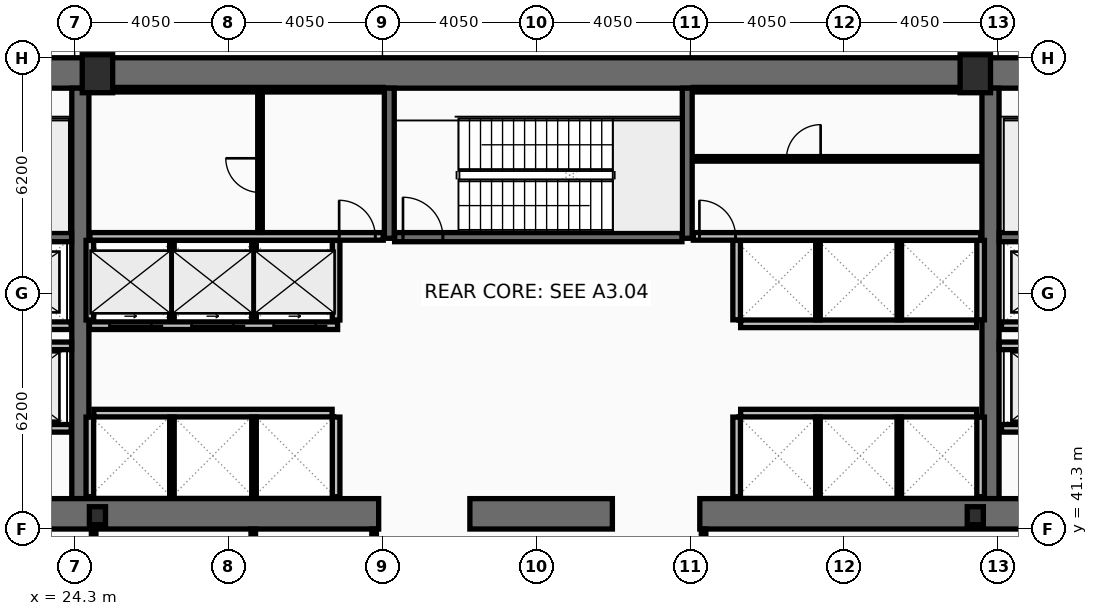
"""IFC4 building model, lengths in metres.
Left out: names, types, materials, properties, quantities, classifications, styles, units other than length and angle.
Written with IfcOpenShell. Run it as: python <this file> out.ifc"""

import sys

from ifc_helpers import new_model, si_unit, direction, frame, frame_2d, origin, origin_2d, place, context, subcontext, project, spatial, rectangle, hollow_rectangle, i_section, extrude, element, fill, save


model = new_model("IFC4")
c1 = context("Model", 3, precision=1e-05, world=origin(), true_north=direction((0.0, 1.0)))
c2 = subcontext(c1, "Body", "Model", "MODEL_VIEW")
j1 = project(units=[si_unit("LENGTHUNIT", "METRE"), si_unit("PLANEANGLEUNIT", "RADIAN")], contexts=[c1])
p1 = place(None, origin())
s1 = spatial("IfcSite", under=j1, at=p1, CompositionType="ELEMENT")
p2 = place(p1, origin())
s2 = spatial("IfcBuilding", under=s1, at=p2, CompositionType="ELEMENT")
p3 = place(p2, frame((0.0, 0.0, 5.4)))
s3 = spatial("IfcBuildingStorey", under=s2, at=p3, CompositionType="ELEMENT", Elevation=5.4)
p4 = place(p3, frame((16.2, 53.3, 0.0), z_axis=(0.0, 0.0, 1.0), x_axis=(1.0, 0.0, 0.0)))
e1 = element("IfcWall", 1, at=p4, inside=s3, PredefinedType="SHEAR", context=c2, shape_type="SweptSolid", body=[
    extrude(rectangle(XDim=40.5, YDim=0.8, at=frame_2d((20.25, 0.0))), origin(), (0.0, 0.0, 1.0), 4.8),
])
for number, where, z_axis, x_axis in (
    (2, (24.45, 42.1, 0.0), (0.0, 0.0, 1.0), (0.0, 1.0, 0.0)),
    (3, (48.4, 42.1, 0.0), (0.0, 0.0, 1.0), (0.0, 1.0, 0.0)),
):
    element("IfcWall", number, at=place(p3, frame(where, z_axis=z_axis, x_axis=x_axis)), inside=s3, PredefinedType="SHEAR", context=c2, shape_type="SweptSolid", body=[
        extrude(rectangle(XDim=10.8, YDim=0.45, at=frame_2d((5.4, 0.0))), origin(), (0.0, 0.0, 1.0), 4.8),
    ])
p5 = place(p3, frame((32.3, 41.7, 0.0), z_axis=(0.0, 0.0, 1.0), x_axis=(-1.0, 0.0, 0.0)))
e4 = element("IfcWall", 4, at=p5, inside=s3, PredefinedType="SHEAR", context=c2, shape_type="SweptSolid", body=[
    extrude(rectangle(XDim=11.45, YDim=0.8, at=frame_2d((5.725, 0.0))), origin(), (0.0, 0.0, 1.0), 4.8),
])
p6 = place(p3, frame((38.45, 41.7, 0.0), z_axis=(0.0, 0.0, 1.0), x_axis=(-1.0, 0.0, 0.0)))
e5 = element("IfcWall", 5, at=p6, inside=s3, PredefinedType="SHEAR", context=c2, shape_type="SweptSolid", body=[
    extrude(rectangle(XDim=3.75, YDim=0.8, at=frame_2d((1.875, 0.0))), origin(), (0.0, 0.0, 1.0), 4.8),
])
p7 = place(p3, frame((52.05, 41.7, 0.0), z_axis=(0.0, 0.0, 1.0), x_axis=(-1.0, 0.0, 0.0)))
e6 = element("IfcWall", 6, at=p7, inside=s3, PredefinedType="SHEAR", context=c2, shape_type="SweptSolid", body=[
    extrude(rectangle(XDim=11.3, YDim=0.8, at=frame_2d((5.65, 0.0))), origin(), (0.0, 0.0, 1.0), 4.8),
])
for number, where, z_axis, x_axis in (
    (7, (32.58, 48.95, 0.0), (0.0, 0.0, 1.0), (0.0, 1.0, 0.0)),
    (8, (40.42, 48.95, 0.0), (0.0, 0.0, 1.0), (0.0, 1.0, 0.0)),
):
    element("IfcWall", number, at=place(p3, frame(where, z_axis=z_axis, x_axis=x_axis)), inside=s3, PredefinedType="SHEAR", context=c2, shape_type="SweptSolid", body=[
        extrude(rectangle(XDim=3.95, YDim=0.26, at=frame_2d((1.975, 0.0))), origin(), (0.0, 0.0, 1.0), 4.8),
    ])
p8 = place(p3, frame((17.0, 48.98, 0.0), z_axis=(0.0, 0.0, 1.0), x_axis=(1.0, 0.0, 0.0)))
e9 = element("IfcWall", 9, at=p8, inside=s3, PredefinedType="SHEAR", context=c2, shape_type="SweptSolid", body=[
    extrude(rectangle(XDim=7.22, YDim=0.24, at=frame_2d((3.61, 0.0))), origin(), (0.0, 0.0, 1.0), 4.8),
])
p9 = place(p8, frame((0.22, 0.0, 0.0)))
e10 = element("IfcOpeningElement", 10, at=p9, cuts=e9, PredefinedType="OPENING", context=c2, shape_type="SweptSolid", body=[
    extrude(rectangle(XDim=1.05, YDim=2.15, at=frame_2d((0.525, 1.075))), frame((0.0, 0.13, 0.0), z_axis=(0.0, -1.0, 0.0), x_axis=(1.0, 0.0, 0.0)), (0.0, 0.0, 1.0), 0.26),
])
p10 = place(p3, frame((48.63, 48.98, 0.0), z_axis=(0.0, 0.0, 1.0), x_axis=(1.0, 0.0, 0.0)))
e11 = element("IfcWall", 11, at=p10, inside=s3, PredefinedType="SHEAR", context=c2, shape_type="SweptSolid", body=[
    extrude(rectangle(XDim=7.27, YDim=0.24, at=frame_2d((3.635, 0.0))), origin(), (0.0, 0.0, 1.0), 4.8),
])
p11 = place(p10, frame((6.0, 0.0, 0.0)))
e12 = element("IfcOpeningElement", 12, at=p11, cuts=e11, PredefinedType="OPENING", context=c2, shape_type="SweptSolid", body=[
    extrude(rectangle(XDim=1.05, YDim=2.15, at=frame_2d((0.525, 1.075))), frame((0.0, 0.13, 0.0), z_axis=(0.0, -1.0, 0.0), x_axis=(1.0, 0.0, 0.0)), (0.0, 0.0, 1.0), 0.26),
])
p12 = place(p3, frame((32.72, 48.98, 0.0), z_axis=(0.0, 0.0, 1.0), x_axis=(1.0, 0.0, 0.0)))
e13 = element("IfcWall", 13, at=p12, inside=s3, PredefinedType="SHEAR", context=c2, shape_type="SweptSolid", body=[
    extrude(rectangle(XDim=7.56, YDim=0.24, at=frame_2d((3.78, 0.0))), origin(), (0.0, 0.0, 1.0), 4.8),
])
p13 = place(p12, frame((0.22, 0.0, 0.0)))
e14 = element("IfcOpeningElement", 14, at=p13, cuts=e13, PredefinedType="OPENING", context=c2, shape_type="SweptSolid", body=[
    extrude(rectangle(XDim=1.05, YDim=2.15, at=frame_2d((0.525, 1.075))), frame((0.0, 0.13, 0.0), z_axis=(0.0, -1.0, 0.0), x_axis=(1.0, 0.0, 0.0)), (0.0, 0.0, 1.0), 0.26),
])
for number, where, z_axis, x_axis in (
    (15, (24.9, 53.28, 0.0), (0.0, 0.0, 1.0), (1.0, 0.0, 0.0)),
    (16, (48.0, 53.28, 0.0), (0.0, 0.0, 1.0), (1.0, 0.0, 0.0)),
):
    element("IfcColumn", number, at=place(p3, frame(where, z_axis=z_axis, x_axis=x_axis)), inside=s3, PredefinedType="COLUMN", context=c2, shape_type="SweptSolid", body=[
        extrude(hollow_rectangle(XDim=0.8, YDim=1.0, WallThickness=0.055, at=origin_2d()), origin(), (0.0, 0.0, 1.0), 5.0),
    ])
for number, where, z_axis, x_axis in (
    (17, (24.9, 41.65, 0.0), (0.0, 0.0, 1.0), (1.0, 0.0, 0.0)),
    (18, (48.0, 41.65, 0.0), (0.0, 0.0, 1.0), (1.0, 0.0, 0.0)),
):
    element("IfcColumn", number, at=place(p3, frame(where, z_axis=z_axis, x_axis=x_axis)), inside=s3, PredefinedType="COLUMN", context=c2, shape_type="SweptSolid", body=[
        extrude(i_section(OverallWidth=0.424, OverallDepth=0.474, WebThickness=0.048, FlangeThickness=0.077, at=origin_2d()), origin(), (0.0, 0.0, 1.0), 5.0),
    ])
p14 = place(p3, frame((51.61, 43.95, 0.0), z_axis=(0.0, 0.0, 1.0), x_axis=(-1.0, 0.0, 0.0)))
e19 = element("IfcWall", 19, at=p14, inside=s3, PredefinedType="PARTITIONING", context=c2, shape_type="SweptSolid", body=[
    extrude(rectangle(XDim=2.92, YDim=0.2, at=frame_2d((1.46, 0.0))), origin(), (0.0, 0.0, 1.0), 4.8),
])
p15 = place(p14, frame((0.81, 0.0, 0.0)))
e20 = element("IfcOpeningElement", 20, at=p15, cuts=e19, PredefinedType="OPENING", context=c2, shape_type="SweptSolid", body=[
    extrude(rectangle(XDim=1.3, YDim=2.18, at=frame_2d((0.65, 1.09))), frame((0.0, 0.11, 0.0), z_axis=(0.0, -1.0, 0.0), x_axis=(1.0, 0.0, 0.0)), (0.0, 0.0, 1.0), 0.22),
])
p16 = place(p3, frame((24.21, 43.95, 0.0), z_axis=(0.0, 0.0, 1.0), x_axis=(-1.0, 0.0, 0.0)))
e21 = element("IfcWall", 21, at=p16, inside=s3, PredefinedType="PARTITIONING", context=c2, shape_type="SweptSolid", body=[
    extrude(rectangle(XDim=2.97, YDim=0.2, at=frame_2d((1.485, 0.0))), origin(), (0.0, 0.0, 1.0), 4.8),
])
p17 = place(p16, frame((0.86, 0.0, 0.0)))
e22 = element("IfcOpeningElement", 22, at=p17, cuts=e21, PredefinedType="OPENING", context=c2, shape_type="SweptSolid", body=[
    extrude(rectangle(XDim=1.3, YDim=2.18, at=frame_2d((0.65, 1.09))), frame((0.0, 0.11, 0.0), z_axis=(0.0, -1.0, 0.0), x_axis=(1.0, 0.0, 0.0)), (0.0, 0.0, 1.0), 0.22),
])
p18 = place(p3, frame((51.61, 46.65, 0.0), z_axis=(0.0, 0.0, 1.0), x_axis=(-1.0, 0.0, 0.0)))
e23 = element("IfcWall", 23, at=p18, inside=s3, PredefinedType="PARTITIONING", context=c2, shape_type="SweptSolid", body=[
    extrude(rectangle(XDim=2.92, YDim=0.2, at=frame_2d((1.46, 0.0))), origin(), (0.0, 0.0, 1.0), 4.8),
])
p19 = place(p18, frame((0.86, 0.0, 0.0)))
e24 = element("IfcOpeningElement", 24, at=p19, cuts=e23, PredefinedType="OPENING", context=c2, shape_type="SweptSolid", body=[
    extrude(rectangle(XDim=1.2, YDim=2.18, at=frame_2d((0.6, 1.09))), frame((0.0, 0.11, 0.0), z_axis=(0.0, -1.0, 0.0), x_axis=(1.0, 0.0, 0.0)), (0.0, 0.0, 1.0), 0.22),
])
p20 = place(p3, frame((24.21, 46.65, 0.0), z_axis=(0.0, 0.0, 1.0), x_axis=(-1.0, 0.0, 0.0)))
e25 = element("IfcWall", 25, at=p20, inside=s3, PredefinedType="PARTITIONING", context=c2, shape_type="SweptSolid", body=[
    extrude(rectangle(XDim=2.97, YDim=0.2, at=frame_2d((1.485, 0.0))), origin(), (0.0, 0.0, 1.0), 4.8),
])
p21 = place(p20, frame((0.91, 0.0, 0.0)))
e26 = element("IfcOpeningElement", 26, at=p21, cuts=e25, PredefinedType="OPENING", context=c2, shape_type="SweptSolid", body=[
    extrude(rectangle(XDim=1.2, YDim=2.18, at=frame_2d((0.6, 1.09))), frame((0.0, 0.11, 0.0), z_axis=(0.0, -1.0, 0.0), x_axis=(1.0, 0.0, 0.0)), (0.0, 0.0, 1.0), 0.22),
])
p22 = place(p3, frame((31.22, 46.65, 0.0), z_axis=(0.0, 0.0, 1.0), x_axis=(-1.0, 0.0, 0.0)))
e27 = element("IfcWall", 27, at=p22, inside=s3, PredefinedType="PARTITIONING", context=c2, shape_type="SweptSolid", body=[
    extrude(rectangle(XDim=6.53, YDim=0.2, at=frame_2d((3.265, 0.0))), origin(), (0.0, 0.0, 1.0), 4.8),
])
p23 = place(p22, frame((4.9, 0.0, 0.0)))
e28 = element("IfcOpeningElement", 28, at=p23, cuts=e27, PredefinedType="OPENING", context=c2, shape_type="SweptSolid", body=[
    extrude(rectangle(XDim=1.1, YDim=2.18, at=frame_2d((0.55, 1.09))), frame((0.0, 0.11, 0.0), z_axis=(0.0, -1.0, 0.0), x_axis=(1.0, 0.0, 0.0)), (0.0, 0.0, 1.0), 0.22),
])
p24 = place(p22, frame((2.74, 0.0, 0.0)))
e29 = element("IfcOpeningElement", 29, at=p24, cuts=e27, PredefinedType="OPENING", context=c2, shape_type="SweptSolid", body=[
    extrude(rectangle(XDim=1.1, YDim=2.18, at=frame_2d((0.55, 1.09))), frame((0.0, 0.11, 0.0), z_axis=(0.0, -1.0, 0.0), x_axis=(1.0, 0.0, 0.0)), (0.0, 0.0, 1.0), 0.22),
])
p25 = place(p22, frame((0.58, 0.0, 0.0)))
e30 = element("IfcOpeningElement", 30, at=p25, cuts=e27, PredefinedType="OPENING", context=c2, shape_type="SweptSolid", body=[
    extrude(rectangle(XDim=1.1, YDim=2.18, at=frame_2d((0.55, 1.09))), frame((0.0, 0.11, 0.0), z_axis=(0.0, -1.0, 0.0), x_axis=(1.0, 0.0, 0.0)), (0.0, 0.0, 1.0), 0.22),
])
p26 = place(p3, frame((21.2, 46.12, 0.0), z_axis=(0.0, 0.0, 1.0), x_axis=(1.0, 0.0, 0.0)))
e31 = element("IfcWall", 31, at=p26, inside=s3, PredefinedType="PARTITIONING", context=c2, shape_type="SweptSolid", body=[
    extrude(rectangle(XDim=3.02, YDim=0.2, at=frame_2d((1.51, 0.0))), origin(), (0.0, 0.0, 1.0), 4.8),
])
p27 = place(p3, frame((48.63, 46.12, 0.0), z_axis=(0.0, 0.0, 1.0), x_axis=(1.0, 0.0, 0.0)))
e32 = element("IfcWall", 32, at=p27, inside=s3, PredefinedType="PARTITIONING", context=c2, shape_type="SweptSolid", body=[
    extrude(rectangle(XDim=3.07, YDim=0.2, at=frame_2d((1.535, 0.0))), origin(), (0.0, 0.0, 1.0), 4.8),
])
for number, where, z_axis, x_axis in (
    (33, (24.7, 46.8, 0.0), (0.0, 0.0, 1.0), (0.0, 1.0, 0.0)),
    (34, (31.18, 46.8, 0.0), (0.0, 0.0, 1.0), (0.0, 1.0, 0.0)),
):
    element("IfcWall", number, at=place(p3, frame(where, z_axis=z_axis, x_axis=x_axis)), inside=s3, PredefinedType="PARTITIONING", context=c2, shape_type="SweptSolid", body=[
        extrude(rectangle(XDim=2.095, YDim=0.2, at=frame_2d((1.047, 0.0))), origin(), (0.0, 0.0, 1.0), 4.8),
    ])
for number, where, z_axis, x_axis in (
    (35, (26.86, 46.8, 0.0), (0.0, 0.0, 1.0), (0.0, 1.0, 0.0)),
    (36, (29.02, 46.8, 0.0), (0.0, 0.0, 1.0), (0.0, 1.0, 0.0)),
):
    element("IfcWall", number, at=place(p3, frame(where, z_axis=z_axis, x_axis=x_axis)), inside=s3, PredefinedType="PARTITIONING", context=c2, shape_type="SweptSolid", body=[
        extrude(rectangle(XDim=2.095, YDim=0.12, at=frame_2d((1.047, 0.0))), origin(), (0.0, 0.0, 1.0), 4.8),
    ])
p28 = place(p3, frame((24.805, 44.35, 0.0), z_axis=(0.0, 0.0, 1.0), x_axis=(1.0, 0.0, 0.0)))
e37 = element("IfcWall", 37, at=p28, inside=s3, PredefinedType="PARTITIONING", context=c2, shape_type="SweptSolid", body=[
    extrude(rectangle(XDim=6.27, YDim=0.2, at=frame_2d((3.135, 0.0))), origin(), (0.0, 0.0, 1.0), 4.8),
])
for number, where, z_axis, x_axis in (
    (38, (24.7, 42.15, 0.0), (0.0, 0.0, 1.0), (0.0, 1.0, 0.0)),
    (39, (31.18, 42.15, 0.0), (0.0, 0.0, 1.0), (0.0, 1.0, 0.0)),
):
    element("IfcWall", number, at=place(p3, frame(where, z_axis=z_axis, x_axis=x_axis)), inside=s3, PredefinedType="PARTITIONING", context=c2, shape_type="SweptSolid", body=[
        extrude(rectangle(XDim=2.095, YDim=0.2, at=frame_2d((1.048, 0.0))), origin(), (0.0, 0.0, 1.0), 4.8),
    ])
for number, where, z_axis, x_axis in (
    (40, (26.86, 42.15, 0.0), (0.0, 0.0, 1.0), (0.0, 1.0, 0.0)),
    (41, (29.02, 42.15, 0.0), (0.0, 0.0, 1.0), (0.0, 1.0, 0.0)),
):
    element("IfcWall", number, at=place(p3, frame(where, z_axis=z_axis, x_axis=x_axis)), inside=s3, PredefinedType="PARTITIONING", context=c2, shape_type="SweptSolid", body=[
        extrude(rectangle(XDim=2.095, YDim=0.12, at=frame_2d((1.048, 0.0))), origin(), (0.0, 0.0, 1.0), 4.8),
    ])
p29 = place(p3, frame((41.825, 46.7, 0.0), z_axis=(0.0, 0.0, 1.0), x_axis=(1.0, 0.0, 0.0)))
e42 = element("IfcWall", 42, at=p29, inside=s3, PredefinedType="PARTITIONING", context=c2, shape_type="SweptSolid", body=[
    extrude(rectangle(XDim=6.21, YDim=0.2, at=frame_2d((3.105, 0.0))), origin(), (0.0, 0.0, 1.0), 4.8),
])
for number, where, z_axis, x_axis in (
    (43, (41.72, 46.805, 0.0), (0.0, 0.0, 1.0), (0.0, 1.0, 0.0)),
    (44, (48.14, 46.805, 0.0), (0.0, 0.0, 1.0), (0.0, 1.0, 0.0)),
):
    element("IfcWall", number, at=place(p3, frame(where, z_axis=z_axis, x_axis=x_axis)), inside=s3, PredefinedType="PARTITIONING", context=c2, shape_type="SweptSolid", body=[
        extrude(rectangle(XDim=2.09, YDim=0.2, at=frame_2d((1.045, 0.0))), origin(), (0.0, 0.0, 1.0), 4.8),
    ])
for number, where, z_axis, x_axis in (
    (45, (43.86, 46.805, 0.0), (0.0, 0.0, 1.0), (0.0, 1.0, 0.0)),
    (46, (46.0, 46.805, 0.0), (0.0, 0.0, 1.0), (0.0, 1.0, 0.0)),
):
    element("IfcWall", number, at=place(p3, frame(where, z_axis=z_axis, x_axis=x_axis)), inside=s3, PredefinedType="PARTITIONING", context=c2, shape_type="SweptSolid", body=[
        extrude(rectangle(XDim=2.09, YDim=0.12, at=frame_2d((1.045, 0.0))), origin(), (0.0, 0.0, 1.0), 4.8),
    ])
p30 = place(p3, frame((41.825, 44.35, 0.0), z_axis=(0.0, 0.0, 1.0), x_axis=(1.0, 0.0, 0.0)))
e47 = element("IfcWall", 47, at=p30, inside=s3, PredefinedType="PARTITIONING", context=c2, shape_type="SweptSolid", body=[
    extrude(rectangle(XDim=6.21, YDim=0.2, at=frame_2d((3.105, 0.0))), origin(), (0.0, 0.0, 1.0), 4.8),
])
for number, where, z_axis, x_axis in (
    (48, (41.72, 42.15, 0.0), (0.0, 0.0, 1.0), (0.0, 1.0, 0.0)),
    (49, (48.14, 42.15, 0.0), (0.0, 0.0, 1.0), (0.0, 1.0, 0.0)),
):
    element("IfcWall", number, at=place(p3, frame(where, z_axis=z_axis, x_axis=x_axis)), inside=s3, PredefinedType="PARTITIONING", context=c2, shape_type="SweptSolid", body=[
        extrude(rectangle(XDim=2.095, YDim=0.2, at=frame_2d((1.048, 0.0))), origin(), (0.0, 0.0, 1.0), 4.8),
    ])
for number, where, z_axis, x_axis in (
    (50, (43.86, 42.15, 0.0), (0.0, 0.0, 1.0), (0.0, 1.0, 0.0)),
    (51, (46.0, 42.15, 0.0), (0.0, 0.0, 1.0), (0.0, 1.0, 0.0)),
):
    element("IfcWall", number, at=place(p3, frame(where, z_axis=z_axis, x_axis=x_axis)), inside=s3, PredefinedType="PARTITIONING", context=c2, shape_type="SweptSolid", body=[
        extrude(rectangle(XDim=2.095, YDim=0.12, at=frame_2d((1.048, 0.0))), origin(), (0.0, 0.0, 1.0), 4.8),
    ])
p31 = place(p3, frame((24.7, 52.86, 0.0), z_axis=(0.0, 0.0, 1.0), x_axis=(1.0, 0.0, 0.0)))
e52 = element("IfcWall", 52, at=p31, inside=s3, PredefinedType="PARTITIONING", context=c2, shape_type="SweptSolid", body=[
    extrude(rectangle(XDim=7.72, YDim=0.12, at=frame_2d((3.86, 0.0))), origin(), (0.0, 0.0, 1.0), 4.8),
])
p32 = place(p3, frame((24.7, 49.0, 0.0), z_axis=(0.0, 0.0, 1.0), x_axis=(1.0, 0.0, 0.0)))
e53 = element("IfcWall", 53, at=p32, inside=s3, PredefinedType="PARTITIONING", context=c2, shape_type="SweptSolid", body=[
    extrude(rectangle(XDim=7.72, YDim=0.2, at=frame_2d((3.86, 0.0))), origin(), (0.0, 0.0, 1.0), 4.8),
])
p33 = place(p32, frame((6.56, 0.0, 0.0)))
e54 = element("IfcOpeningElement", 54, at=p33, cuts=e53, PredefinedType="OPENING", context=c2, shape_type="SweptSolid", body=[
    extrude(rectangle(XDim=0.95, YDim=2.1, at=frame_2d((0.475, 1.05))), frame((0.0, 0.11, 0.0), z_axis=(0.0, -1.0, 0.0), x_axis=(1.0, 0.0, 0.0)), (0.0, 0.0, 1.0), 0.22),
])
p34 = place(p3, frame((29.177, 49.105, 0.0), z_axis=(0.0, 0.0, 1.0), x_axis=(0.0, 1.0, 0.0)))
e55 = element("IfcWall", 55, at=p34, inside=s3, PredefinedType="PARTITIONING", context=c2, shape_type="SweptSolid", body=[
    extrude(rectangle(XDim=3.69, YDim=0.12, at=frame_2d((1.845, 0.0))), origin(), (0.0, 0.0, 1.0), 4.8),
])
p35 = place(p34, frame((1.05, 0.0, 0.0)))
e56 = element("IfcOpeningElement", 56, at=p35, cuts=e55, PredefinedType="OPENING", context=c2, shape_type="SweptSolid", body=[
    extrude(rectangle(XDim=0.9, YDim=2.05, at=frame_2d((0.45, 1.025))), frame((0.0, 0.07, 0.0), z_axis=(0.0, -1.0, 0.0), x_axis=(1.0, 0.0, 0.0)), (0.0, 0.0, 1.0), 0.14),
])
p36 = place(p3, frame((40.58, 52.86, 0.0), z_axis=(0.0, 0.0, 1.0), x_axis=(1.0, 0.0, 0.0)))
e57 = element("IfcWall", 57, at=p36, inside=s3, PredefinedType="PARTITIONING", context=c2, shape_type="SweptSolid", body=[
    extrude(rectangle(XDim=7.56, YDim=0.12, at=frame_2d((3.78, 0.0))), origin(), (0.0, 0.0, 1.0), 4.8),
])
p37 = place(p3, frame((40.58, 49.0, 0.0), z_axis=(0.0, 0.0, 1.0), x_axis=(1.0, 0.0, 0.0)))
e58 = element("IfcWall", 58, at=p37, inside=s3, PredefinedType="PARTITIONING", context=c2, shape_type="SweptSolid", body=[
    extrude(rectangle(XDim=7.56, YDim=0.2, at=frame_2d((3.78, 0.0))), origin(), (0.0, 0.0, 1.0), 4.8),
])
p38 = place(p37, frame((0.16, 0.0, 0.0)))
e59 = element("IfcOpeningElement", 59, at=p38, cuts=e58, PredefinedType="OPENING", context=c2, shape_type="SweptSolid", body=[
    extrude(rectangle(XDim=0.95, YDim=2.1, at=frame_2d((0.475, 1.05))), frame((0.0, 0.11, 0.0), z_axis=(0.0, -1.0, 0.0), x_axis=(1.0, 0.0, 0.0)), (0.0, 0.0, 1.0), 0.22),
])
p39 = place(p3, frame((40.63, 51.04, 0.0), z_axis=(0.0, 0.0, 1.0), x_axis=(1.0, 0.0, 0.0)))
e60 = element("IfcWall", 60, at=p39, inside=s3, PredefinedType="PARTITIONING", context=c2, shape_type="SweptSolid", body=[
    extrude(rectangle(XDim=7.46, YDim=0.12, at=frame_2d((3.73, 0.0))), origin(), (0.0, 0.0, 1.0), 4.8),
])
p40 = place(p39, frame((2.4, 0.0, 0.0)))
e61 = element("IfcOpeningElement", 61, at=p40, cuts=e60, PredefinedType="OPENING", context=c2, shape_type="SweptSolid", body=[
    extrude(rectangle(XDim=0.9, YDim=2.05, at=frame_2d((0.45, 1.025))), frame((0.0, 0.07, 0.0), z_axis=(0.0, -1.0, 0.0), x_axis=(1.0, 0.0, 0.0)), (0.0, 0.0, 1.0), 0.14),
])
p41 = place(p3, frame((24.8, 38.28, 0.0), z_axis=(0.0, 0.0, 1.0), x_axis=(0.0, 1.0, 0.0)))
e62 = element("IfcWall", 62, at=p41, inside=s3, PredefinedType="PARTITIONING", context=c2, shape_type="SweptSolid", body=[
    extrude(rectangle(XDim=3.02, YDim=0.12, at=frame_2d((1.51, 0.0))), origin(), (0.0, 0.0, 1.0), 3.89),
])
for number, where, z_axis, x_axis in (
    (63, (29.0, 38.28, 0.0), (0.0, 0.0, 1.0), (0.0, 1.0, 0.0)),
    (64, (32.18, 38.28, 0.0), (0.0, 0.0, 1.0), (0.0, 1.0, 0.0)),
    (65, (40.85, 38.28, 0.0), (0.0, 0.0, 1.0), (0.0, 1.0, 0.0)),
):
    element("IfcWall", number, at=place(p3, frame(where, z_axis=z_axis, x_axis=x_axis)), inside=s3, PredefinedType="PARTITIONING", context=c2, shape_type="SweptSolid", body=[
        extrude(rectangle(XDim=3.02, YDim=0.12, at=frame_2d((1.51, 0.0))), origin(), (0.0, 0.0, 1.0), 4.8),
    ])
p42 = place(p13, origin())
e66 = element("IfcDoor", 66, at=p42, inside=s3, OperationType="SINGLE_SWING_LEFT", PredefinedType="DOOR", context=c2, shape_type="SweptSolid", body=[
    extrude(rectangle(XDim=1.05, YDim=2.15, at=frame_2d((0.525, 1.075))), frame((0.0, 0.025, 0.0), z_axis=(0.0, -1.0, 0.0), x_axis=(1.0, 0.0, 0.0)), (0.0, 0.0, 1.0), 0.05),
])
fill(e14, e66)
p43 = place(p23, origin())
e67 = element("IfcDoor", 67, at=p43, inside=s3, OperationType="SLIDING_TO_LEFT", PredefinedType="DOOR", context=c2, shape_type="SweptSolid", body=[
    extrude(rectangle(XDim=1.1, YDim=2.18, at=frame_2d((0.55, 1.09))), frame((0.0, 0.025, 0.0), z_axis=(0.0, -1.0, 0.0), x_axis=(1.0, 0.0, 0.0)), (0.0, 0.0, 1.0), 0.05),
])
fill(e28, e67)
p44 = place(p24, origin())
e68 = element("IfcDoor", 68, at=p44, inside=s3, OperationType="SLIDING_TO_LEFT", PredefinedType="DOOR", context=c2, shape_type="SweptSolid", body=[
    extrude(rectangle(XDim=1.1, YDim=2.18, at=frame_2d((0.55, 1.09))), frame((0.0, 0.025, 0.0), z_axis=(0.0, -1.0, 0.0), x_axis=(1.0, 0.0, 0.0)), (0.0, 0.0, 1.0), 0.05),
])
fill(e29, e68)
p45 = place(p25, origin())
e69 = element("IfcDoor", 69, at=p45, inside=s3, OperationType="SLIDING_TO_LEFT", PredefinedType="DOOR", context=c2, shape_type="SweptSolid", body=[
    extrude(rectangle(XDim=1.1, YDim=2.18, at=frame_2d((0.55, 1.09))), frame((0.0, 0.025, 0.0), z_axis=(0.0, -1.0, 0.0), x_axis=(1.0, 0.0, 0.0)), (0.0, 0.0, 1.0), 0.05),
])
fill(e30, e69)
p46 = place(p33, origin())
e70 = element("IfcDoor", 70, at=p46, inside=s3, OperationType="SINGLE_SWING_LEFT", PredefinedType="DOOR", context=c2, shape_type="SweptSolid", body=[
    extrude(rectangle(XDim=0.95, YDim=2.1, at=frame_2d((0.475, 1.05))), frame((0.0, 0.025, 0.0), z_axis=(0.0, -1.0, 0.0), x_axis=(1.0, 0.0, 0.0)), (0.0, 0.0, 1.0), 0.05),
])
fill(e54, e70)
p47 = place(p35, origin())
e71 = element("IfcDoor", 71, at=p47, inside=s3, OperationType="SINGLE_SWING_RIGHT", PredefinedType="DOOR", context=c2, shape_type="SweptSolid", body=[
    extrude(rectangle(XDim=0.9, YDim=2.05, at=frame_2d((0.45, 1.025))), frame((0.0, 0.025, 0.0), z_axis=(0.0, -1.0, 0.0), x_axis=(1.0, 0.0, 0.0)), (0.0, 0.0, 1.0), 0.05),
])
fill(e56, e71)
p48 = place(p38, origin())
e72 = element("IfcDoor", 72, at=p48, inside=s3, OperationType="SINGLE_SWING_LEFT", PredefinedType="DOOR", context=c2, shape_type="SweptSolid", body=[
    extrude(rectangle(XDim=0.95, YDim=2.1, at=frame_2d((0.475, 1.05))), frame((0.0, 0.025, 0.0), z_axis=(0.0, -1.0, 0.0), x_axis=(1.0, 0.0, 0.0)), (0.0, 0.0, 1.0), 0.05),
])
fill(e59, e72)
p49 = place(p40, origin())
e73 = element("IfcDoor", 73, at=p49, inside=s3, OperationType="SINGLE_SWING_RIGHT", PredefinedType="DOOR", context=c2, shape_type="SweptSolid", body=[
    extrude(rectangle(XDim=0.9, YDim=2.05, at=frame_2d((0.45, 1.025))), frame((0.0, 0.025, 0.0), z_axis=(0.0, -1.0, 0.0), x_axis=(1.0, 0.0, 0.0)), (0.0, 0.0, 1.0), 0.05),
])
fill(e61, e73)
save(model, sys.argv[1])
